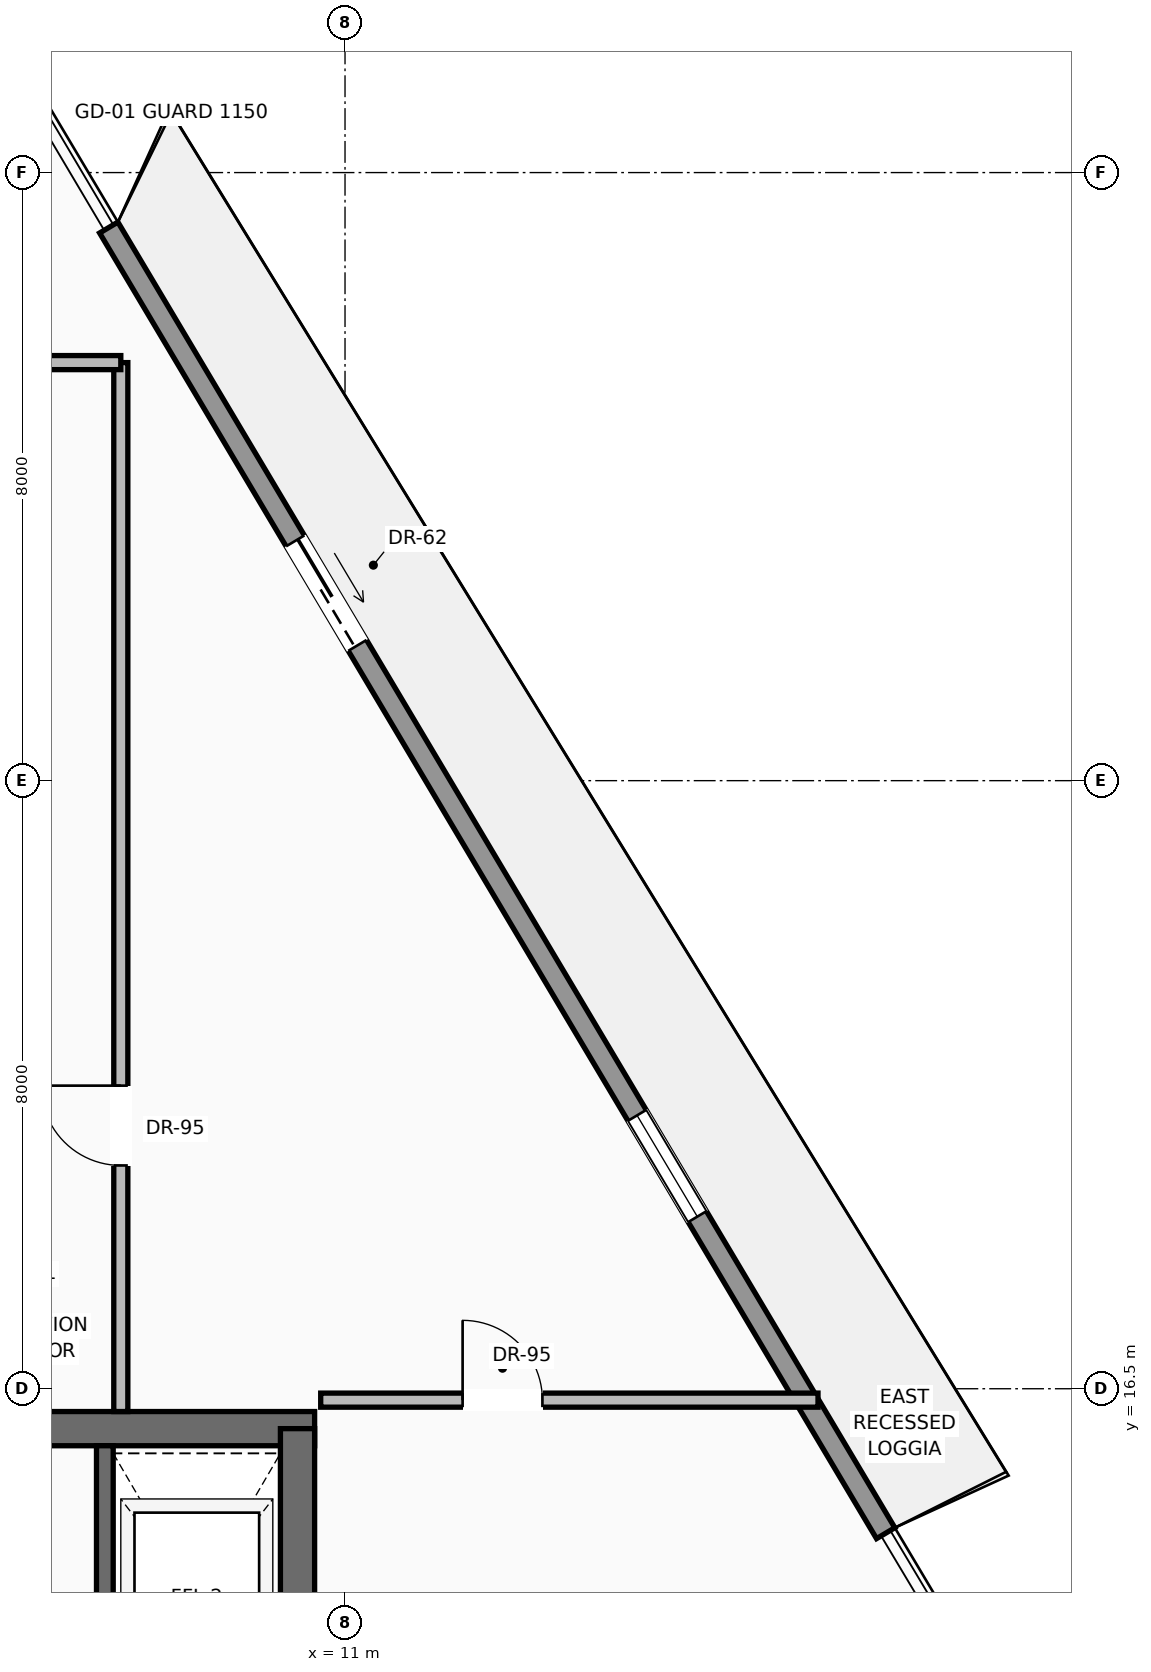
"""IFC4 building model, lengths in metres.
Left out: names, types, materials, properties, quantities, classifications, styles, units other than length and angle.
Written with IfcOpenShell. Run it as: python <this file> out.ifc"""

import sys

from ifc_helpers import new_model, si_unit, direction, frame, frame_2d, origin, place, context, subcontext, project, spatial, rectangle, extrude, source, transform, mapped, element, fill, save


model = new_model("IFC4")
c1 = context("Model", 3, precision=1e-05, world=origin(), true_north=direction((0.0, 1.0)))
c2 = subcontext(c1, "Body", "Model", "MODEL_VIEW")
j1 = project(units=[si_unit("LENGTHUNIT", "METRE"), si_unit("PLANEANGLEUNIT", "RADIAN")], contexts=[c1])
p1 = place(None, origin())
s1 = spatial("IfcSite", under=j1, at=p1, CompositionType="ELEMENT")
p2 = place(p1, origin())
s2 = spatial("IfcBuilding", under=s1, at=p2, CompositionType="ELEMENT")
p3 = place(p2, frame((0.0, 0.0, 273.0)))
s3 = spatial("IfcBuildingStorey", under=s2, at=p3, CompositionType="ELEMENT", Elevation=273.0)
p4 = place(p3, frame((-10.6, 15.975, 0.0), z_axis=(0.0, 0.0, 1.0), x_axis=(1.0, 0.0, 0.0)))
e1 = element("IfcWall", 1, at=p4, inside=s3, PredefinedType="SHEAR", context=c2, shape_type="SweptSolid", body=[
    extrude(rectangle(XDim=21.2, YDim=0.45, at=frame_2d((10.6, 0.0))), origin(), (0.0, 0.0, 1.0), 3.24),
])
p5 = place(p4, frame((3.17, 0.0, 0.0)))
e2 = element("IfcOpeningElement", 2, at=p5, cuts=e1, PredefinedType="OPENING", context=c2, shape_type="SweptSolid", body=[
    extrude(rectangle(XDim=1.3, YDim=2.3, at=frame_2d((0.65, 1.15))), frame((0.0, 0.235, 0.0), z_axis=(0.0, -1.0, 0.0), x_axis=(1.0, 0.0, 0.0)), (0.0, 0.0, 1.0), 0.47),
])
p6 = place(p4, frame((9.6, 0.0, 0.0)))
e3 = element("IfcOpeningElement", 3, at=p6, cuts=e1, PredefinedType="OPENING", context=c2, shape_type="SweptSolid", body=[
    extrude(rectangle(XDim=2.0, YDim=2.4, at=frame_2d((1.0, 1.2))), frame((0.0, 0.235, 0.0), z_axis=(0.0, -1.0, 0.0), x_axis=(1.0, 0.0, 0.0)), (0.0, 0.0, 1.0), 0.47),
])
p7 = place(p3, frame((10.375, 0.625, 0.0), z_axis=(0.0, 0.0, 1.0), x_axis=(0.0, 1.0, 0.0)))
e4 = element("IfcWall", 4, at=p7, inside=s3, PredefinedType="SHEAR", context=c2, shape_type="SweptSolid", body=[
    extrude(rectangle(XDim=15.35, YDim=0.45, at=frame_2d((7.675, 0.0))), origin(), (0.0, 0.0, 1.0), 3.24),
])
p8 = place(p3, frame((7.892, 31.777, 0.0), z_axis=(0.0, 0.0, 1.0), x_axis=(0.511386799139, -0.85935065117, 0.0)))
e5 = element("IfcWall", 5, at=p8, inside=s3, PredefinedType="SOLIDWALL", context=c2, shape_type="SweptSolid", body=[
    extrude(rectangle(XDim=19.989, YDim=0.28, at=frame_2d((9.994, 0.0))), origin(), (0.0, 0.0, 1.0), 2.82),
])
p9 = place(p8, frame((4.797, 0.0, 0.0)))
e6 = element("IfcOpeningElement", 6, at=p9, cuts=e5, PredefinedType="OPENING", context=c2, shape_type="SweptSolid", body=[
    extrude(rectangle(XDim=1.6, YDim=2.35, at=frame_2d((0.8, 1.175))), frame((0.0, 0.15, 0.0), z_axis=(0.0, -1.0, 0.0), x_axis=(1.0, 0.0, 0.0)), (0.0, 0.0, 1.0), 0.3),
])
p10 = place(p8, frame((13.592, 0.0, 0.9)))
e7 = element("IfcOpeningElement", 7, at=p10, cuts=e5, PredefinedType="OPENING", context=c2, shape_type="SweptSolid", body=[
    extrude(rectangle(XDim=1.55, YDim=1.75, at=frame_2d((0.775, 0.875))), frame((0.0, 0.15, 0.0), z_axis=(0.0, -1.0, 0.0), x_axis=(1.0, 0.0, 0.0)), (0.0, 0.0, 1.0), 0.3),
])
p11 = place(p3, frame((7.84, 11.87, 0.0), z_axis=(0.0, 0.0, 1.0), x_axis=(0.0, 1.0, 0.0)))
e8 = element("IfcWall", 8, at=p11, inside=s3, PredefinedType="SOLIDWALL", context=c2, shape_type="SweptSolid", body=[
    extrude(rectangle(XDim=3.88, YDim=0.22, at=frame_2d((1.94, 0.0))), origin(), (0.0, 0.0, 1.0), 3.24),
])
p12 = place(p3, frame((8.05, 16.2, 0.0), z_axis=(0.0, 0.0, 1.0), x_axis=(0.0, 1.0, 0.0)))
e9 = element("IfcWall", 9, at=p12, inside=s3, PredefinedType="PARTITIONING", context=c2, shape_type="SweptSolid", body=[
    extrude(rectangle(XDim=13.8, YDim=0.185, at=frame_2d((6.9, 0.0))), origin(), (0.0, 0.0, 1.0), 3.232),
])
p13 = place(p12, frame((3.238, 0.0, 0.0)))
e10 = element("IfcOpeningElement", 10, at=p13, cuts=e9, PredefinedType="OPENING", context=c2, shape_type="SweptSolid", body=[
    extrude(rectangle(XDim=1.05, YDim=2.25, at=frame_2d((0.525, 1.125))), frame((0.0, 0.103, 0.0), z_axis=(0.0, -1.0, 0.0), x_axis=(1.0, 0.0, 0.0)), (0.0, 0.0, 1.0), 0.205),
])
p14 = place(p3, frame((-8.6, 30.0, 0.0), z_axis=(0.0, 0.0, 1.0), x_axis=(1.0, 0.0, 0.0)))
e11 = element("IfcWall", 11, at=p14, inside=s3, PredefinedType="PARTITIONING", context=c2, shape_type="SweptSolid", body=[
    extrude(rectangle(XDim=16.65, YDim=0.185, at=frame_2d((8.325, 0.0))), origin(), (0.0, 0.0, 1.0), 3.232),
])
p15 = place(p14, frame((3.9, 0.0, 0.0)))
e12 = element("IfcOpeningElement", 12, at=p15, cuts=e11, PredefinedType="OPENING", context=c2, shape_type="SweptSolid", body=[
    extrude(rectangle(XDim=1.05, YDim=2.25, at=frame_2d((0.525, 1.125))), frame((0.0, 0.103, 0.0), z_axis=(0.0, -1.0, 0.0), x_axis=(1.0, 0.0, 0.0)), (0.0, 0.0, 1.0), 0.205),
])
p16 = place(p14, frame((7.8, 0.0, 0.0)))
e13 = element("IfcOpeningElement", 13, at=p16, cuts=e11, PredefinedType="OPENING", context=c2, shape_type="SweptSolid", body=[
    extrude(rectangle(XDim=1.05, YDim=2.25, at=frame_2d((0.525, 1.125))), frame((0.0, 0.103, 0.0), z_axis=(0.0, -1.0, 0.0), x_axis=(1.0, 0.0, 0.0)), (0.0, 0.0, 1.0), 0.205),
])
p17 = place(p14, frame((12.25, 0.0, 0.0)))
e14 = element("IfcOpeningElement", 14, at=p17, cuts=e11, PredefinedType="OPENING", context=c2, shape_type="SweptSolid", body=[
    extrude(rectangle(XDim=1.05, YDim=2.25, at=frame_2d((0.525, 1.125))), frame((0.0, 0.103, 0.0), z_axis=(0.0, -1.0, 0.0), x_axis=(1.0, 0.0, 0.0)), (0.0, 0.0, 1.0), 0.205),
])
p18 = place(p3, frame((10.68, 16.35, 0.0), z_axis=(0.0, 0.0, 1.0), x_axis=(1.0, 0.0, 0.0)))
e15 = element("IfcWall", 15, at=p18, inside=s3, PredefinedType="PARTITIONING", context=c2, shape_type="SweptSolid", body=[
    extrude(rectangle(XDim=6.543, YDim=0.185, at=frame_2d((3.271, 0.0))), origin(), (0.0, 0.0, 1.0), 3.232),
])
p19 = place(p18, frame((1.867, 0.0, 0.0)))
e16 = element("IfcOpeningElement", 16, at=p19, cuts=e15, PredefinedType="OPENING", context=c2, shape_type="SweptSolid", body=[
    extrude(rectangle(XDim=1.05, YDim=2.25, at=frame_2d((0.525, 1.125))), frame((0.0, 0.103, 0.0), z_axis=(0.0, -1.0, 0.0), x_axis=(1.0, 0.0, 0.0)), (0.0, 0.0, 1.0), 0.205),
])
m1 = source(origin(), c2, "Body", "SweptSolid", [
    extrude(rectangle(XDim=1.6, YDim=2.35, at=frame_2d((0.8, 1.175))), frame((0.0, 0.025, 0.0), z_axis=(0.0, -1.0, 0.0), x_axis=(1.0, 0.0, 0.0)), (0.0, 0.0, 1.0), 0.05),
])
p20 = place(p9, origin())
e17 = element("IfcDoor", 17, at=p20, inside=s3, OperationType="SLIDING_TO_RIGHT", PredefinedType="DOOR", context=c2, shape_type="MappedRepresentation", body=[
    mapped(m1, transform((0.0, 0.0, 0.0), scale=1.0)),
])
fill(e6, e17)
m2 = source(origin(), c2, "Body", "SweptSolid", [
    extrude(rectangle(XDim=1.55, YDim=1.75, at=frame_2d((0.775, 0.875))), frame((0.0, 0.03, 0.0), z_axis=(0.0, -1.0, 0.0), x_axis=(1.0, 0.0, 0.0)), (0.0, 0.0, 1.0), 0.06),
])
p21 = place(p10, origin())
e18 = element("IfcWindow", 18, at=p21, inside=s3, PartitioningType="SINGLE_PANEL", PredefinedType="WINDOW", context=c2, shape_type="MappedRepresentation", body=[
    mapped(m2, transform((0.0, 0.0, 0.0), scale=1.0)),
])
fill(e7, e18)
m3 = source(origin(), c2, "Body", "SweptSolid", [
    extrude(rectangle(XDim=1.05, YDim=2.25, at=frame_2d((0.525, 1.125))), frame((0.0, 0.025, 0.0), z_axis=(0.0, -1.0, 0.0), x_axis=(1.0, 0.0, 0.0)), (0.0, 0.0, 1.0), 0.05),
])
p22 = place(p19, origin())
e19 = element("IfcDoor", 19, at=p22, inside=s3, OperationType="SINGLE_SWING_LEFT", PredefinedType="DOOR", context=c2, shape_type="MappedRepresentation", body=[
    mapped(m3, transform((0.0, 0.0, 0.0), scale=1.0)),
])
fill(e16, e19)
p23 = place(p13, origin())
e20 = element("IfcDoor", 20, at=p23, inside=s3, OperationType="SINGLE_SWING_RIGHT", PredefinedType="DOOR", context=c2, shape_type="MappedRepresentation", body=[
    mapped(m3, transform((0.0, 0.0, 0.0), scale=1.0)),
])
fill(e10, e20)
save(model, sys.argv[1])
